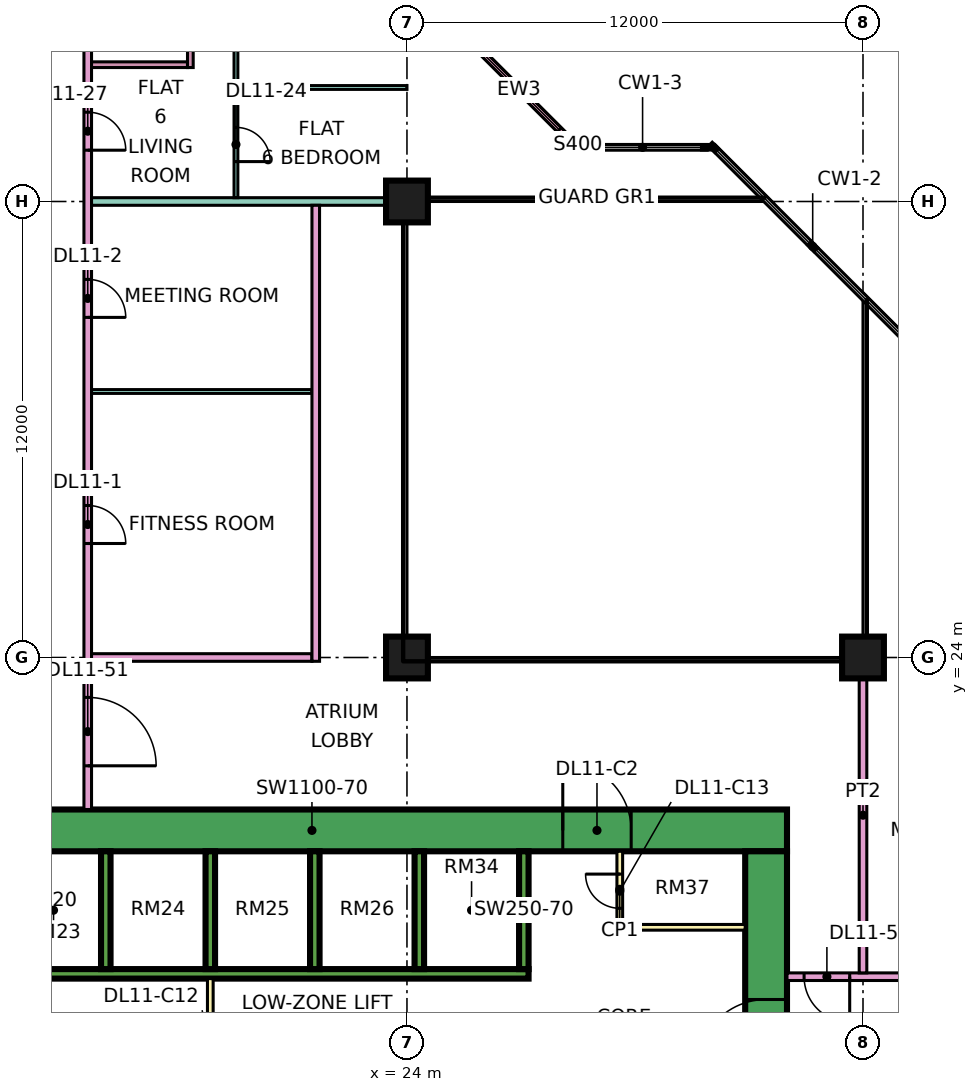
"""IFC4 building model, lengths in metres.
Left out: names, types, materials, properties, quantities, classifications, styles, units other than length and angle.
Written with IfcOpenShell. Run it as: python <this file> out.ifc"""

import sys

from ifc_helpers import new_model, si_unit, direction, frame, frame_2d, origin, origin_2d, place, context, subcontext, project, spatial, rectangle, extrude, element, fill, save


model = new_model("IFC4")
c1 = context("Model", 3, precision=1e-05, world=origin(), true_north=direction((0.0, 1.0)))
c2 = subcontext(c1, "Body", "Model", "MODEL_VIEW")
j1 = project(units=[si_unit("LENGTHUNIT", "METRE"), si_unit("PLANEANGLEUNIT", "RADIAN")], contexts=[c1])
p1 = place(None, origin())
s1 = spatial("IfcSite", under=j1, at=p1, CompositionType="ELEMENT")
p2 = place(p1, origin())
s2 = spatial("IfcBuilding", under=s1, at=p2, CompositionType="ELEMENT")
p3 = place(p2, frame((0.0, 0.0, 56.4)))
s3 = spatial("IfcBuildingStorey", under=s2, at=p3, CompositionType="ELEMENT", Elevation=56.4)
for number, where, z_axis, x_axis in (
    (1, (24.0, 24.0, 0.0), (0.0, 0.0, 1.0), (1.0, 0.0, 0.0)),
    (2, (24.0, 36.0, 0.0), (0.0, 0.0, 1.0), (1.0, 0.0, 0.0)),
    (3, (36.0, 24.0, 0.0), (0.0, 0.0, 1.0), (1.0, 0.0, 0.0)),
):
    element("IfcColumn", number, at=place(p3, frame(where, z_axis=z_axis, x_axis=x_axis)), inside=s3, PredefinedType="COLUMN", context=c2, shape_type="SweptSolid", body=[
        extrude(rectangle(XDim=1.1, YDim=1.1, at=origin_2d()), origin(), (0.0, 0.0, 1.0), 3.75),
    ])
p4 = place(p3, frame((9.0, 19.45, 0.0), z_axis=(0.0, 0.0, 1.0), x_axis=(1.0, 0.0, 0.0)))
e4 = element("IfcWall", 4, at=p4, inside=s3, PredefinedType="SHEAR", context=c2, shape_type="SweptSolid", body=[
    extrude(rectangle(XDim=25.0, YDim=1.1, at=frame_2d((12.5, 0.0))), origin(), (0.0, 0.0, 1.0), 3.75),
])
p5 = place(p4, frame((19.1, 0.0, 0.0)))
e5 = element("IfcOpeningElement", 5, at=p5, cuts=e4, PredefinedType="OPENING", context=c2, shape_type="SweptSolid", body=[
    extrude(rectangle(XDim=1.8, YDim=2.4, at=frame_2d((0.9, 1.2))), frame((0.0, 0.56, 0.0), z_axis=(0.0, -1.0, 0.0), x_axis=(1.0, 0.0, 0.0)), (0.0, 0.0, 1.0), 1.12),
])
p6 = place(p3, frame((33.45, 8.1, 0.0), z_axis=(0.0, 0.0, 1.0), x_axis=(0.0, 1.0, 0.0)))
e6 = element("IfcWall", 6, at=p6, inside=s3, PredefinedType="SHEAR", context=c2, shape_type="SweptSolid", body=[
    extrude(rectangle(XDim=10.8, YDim=1.1, at=frame_2d((5.4, 0.0))), origin(), (0.0, 0.0, 1.0), 3.75),
])
p7 = place(p6, frame((5.1, 0.0, 0.0)))
e7 = element("IfcOpeningElement", 7, at=p7, cuts=e6, PredefinedType="OPENING", context=c2, shape_type="SweptSolid", body=[
    extrude(rectangle(XDim=1.8, YDim=2.4, at=frame_2d((0.9, 1.2))), frame((0.0, 0.56, 0.0), z_axis=(0.0, -1.0, 0.0), x_axis=(1.0, 0.0, 0.0)), (0.0, 0.0, 1.0), 1.12),
])
p8 = place(p3, frame((13.45, 15.675, 0.0), z_axis=(0.0, 0.0, 1.0), x_axis=(1.0, 0.0, 0.0)))
e8 = element("IfcWall", 8, at=p8, inside=s3, PredefinedType="SHEAR", context=c2, shape_type="SweptSolid", body=[
    extrude(rectangle(XDim=13.75, YDim=0.25, at=frame_2d((6.875, 0.0))), origin(), (0.0, 0.0, 1.0), 3.75),
])
for number, where, z_axis, x_axis in (
    (9, (16.075, 15.8, 0.0), (0.0, 0.0, 1.0), (0.0, 1.0, 0.0)),
    (10, (18.825, 15.8, 0.0), (0.0, 0.0, 1.0), (0.0, 1.0, 0.0)),
    (11, (21.575, 15.8, 0.0), (0.0, 0.0, 1.0), (0.0, 1.0, 0.0)),
    (12, (24.325, 15.8, 0.0), (0.0, 0.0, 1.0), (0.0, 1.0, 0.0)),
    (13, (27.075, 15.8, 0.0), (0.0, 0.0, 1.0), (0.0, 1.0, 0.0)),
):
    element("IfcWall", number, at=place(p3, frame(where, z_axis=z_axis, x_axis=x_axis)), inside=s3, PredefinedType="SHEAR", context=c2, shape_type="SweptSolid", body=[
        extrude(rectangle(XDim=3.1, YDim=0.25, at=frame_2d((1.55, 0.0))), origin(), (0.0, 0.0, 1.0), 3.75),
    ])
p9 = place(p3, frame((28.447, 37.447, 0.0), z_axis=(0.0, 0.0, 1.0), x_axis=(-0.707106781187, 0.707106781187, 0.0)))
e14 = element("IfcWall", 14, at=p9, inside=s3, PredefinedType="SOLIDWALL", context=c2, shape_type="SweptSolid", body=[
    extrude(rectangle(XDim=4.243, YDim=0.15, at=frame_2d((2.121, 0.0))), origin(), (0.0, 0.0, 1.0), 3.35),
])
p10 = place(p9, frame((0.621, 0.0, 0.45)))
e15 = element("IfcOpeningElement", 15, at=p10, cuts=e14, PredefinedType="OPENING", context=c2, shape_type="SweptSolid", body=[
    extrude(rectangle(XDim=3.0, YDim=2.4, at=frame_2d((1.5, 1.2))), frame((0.0, 0.085, 0.0), z_axis=(0.0, -1.0, 0.0), x_axis=(1.0, 0.0, 0.0)), (0.0, 0.0, 1.0), 0.17),
])
p11 = place(p3, frame((18.825, 11.45, 0.0), z_axis=(0.0, 0.0, 1.0), x_axis=(0.0, 1.0, 0.0)))
e16 = element("IfcWall", 16, at=p11, inside=s3, PredefinedType="PARTITIONING", context=c2, shape_type="SweptSolid", body=[
    extrude(rectangle(XDim=4.1, YDim=0.15, at=frame_2d((2.05, 0.0))), origin(), (0.0, 0.0, 1.0), 3.35),
])
p12 = place(p11, frame((1.15, 0.0, 0.0)))
e17 = element("IfcOpeningElement", 17, at=p12, cuts=e16, PredefinedType="OPENING", context=c2, shape_type="SweptSolid", body=[
    extrude(rectangle(XDim=1.8, YDim=2.4, at=frame_2d((0.9, 1.2))), frame((0.0, 0.085, 0.0), z_axis=(0.0, -1.0, 0.0), x_axis=(1.0, 0.0, 0.0)), (0.0, 0.0, 1.0), 0.17),
])
p13 = place(p3, frame((29.6, 16.9, 0.0), z_axis=(0.0, 0.0, 1.0), x_axis=(0.0, 1.0, 0.0)))
e18 = element("IfcWall", 18, at=p13, inside=s3, PredefinedType="PARTITIONING", context=c2, shape_type="SweptSolid", body=[
    extrude(rectangle(XDim=2.0, YDim=0.15, at=frame_2d((1.0, 0.0))), origin(), (0.0, 0.0, 1.0), 3.35),
])
p14 = place(p13, frame((0.5, 0.0, 0.0)))
e19 = element("IfcOpeningElement", 19, at=p14, cuts=e18, PredefinedType="OPENING", context=c2, shape_type="SweptSolid", body=[
    extrude(rectangle(XDim=0.9, YDim=2.1, at=frame_2d((0.45, 1.05))), frame((0.0, 0.085, 0.0), z_axis=(0.0, -1.0, 0.0), x_axis=(1.0, 0.0, 0.0)), (0.0, 0.0, 1.0), 0.17),
])
p15 = place(p3, frame((29.6, 16.9, 0.0), z_axis=(0.0, 0.0, 1.0), x_axis=(1.0, 0.0, 0.0)))
e20 = element("IfcWall", 20, at=p15, inside=s3, PredefinedType="PARTITIONING", context=c2, shape_type="SweptSolid", body=[
    extrude(rectangle(XDim=3.3, YDim=0.15, at=frame_2d((1.65, 0.0))), origin(), (0.0, 0.0, 1.0), 3.35),
])
p16 = place(p3, frame((15.6, 20.0, 0.0), z_axis=(0.0, 0.0, 1.0), x_axis=(0.0, 1.0, 0.0)))
e21 = element("IfcWall", 21, at=p16, inside=s3, PredefinedType="PARTITIONING", context=c2, shape_type="SweptSolid", body=[
    extrude(rectangle(XDim=27.775, YDim=0.2, at=frame_2d((13.887, 0.0))), origin(), (0.0, 0.0, 1.0), 3.35),
])
p17 = place(p16, frame((7.0, 0.0, 0.0)))
e22 = element("IfcOpeningElement", 22, at=p17, cuts=e21, PredefinedType="OPENING", context=c2, shape_type="SweptSolid", body=[
    extrude(rectangle(XDim=1.0, YDim=2.1, at=frame_2d((0.5, 1.05))), frame((0.0, 0.11, 0.0), z_axis=(0.0, -1.0, 0.0), x_axis=(1.0, 0.0, 0.0)), (0.0, 0.0, 1.0), 0.22),
])
p18 = place(p16, frame((12.95, 0.0, 0.0)))
e23 = element("IfcOpeningElement", 23, at=p18, cuts=e21, PredefinedType="OPENING", context=c2, shape_type="SweptSolid", body=[
    extrude(rectangle(XDim=1.0, YDim=2.1, at=frame_2d((0.5, 1.05))), frame((0.0, 0.11, 0.0), z_axis=(0.0, -1.0, 0.0), x_axis=(1.0, 0.0, 0.0)), (0.0, 0.0, 1.0), 0.22),
])
p19 = place(p16, frame((17.35, 0.0, 0.0)))
e24 = element("IfcOpeningElement", 24, at=p19, cuts=e21, PredefinedType="OPENING", context=c2, shape_type="SweptSolid", body=[
    extrude(rectangle(XDim=1.0, YDim=2.1, at=frame_2d((0.5, 1.05))), frame((0.0, 0.11, 0.0), z_axis=(0.0, -1.0, 0.0), x_axis=(1.0, 0.0, 0.0)), (0.0, 0.0, 1.0), 0.22),
])
p20 = place(p16, frame((1.15, 0.0, 0.0)))
e25 = element("IfcOpeningElement", 25, at=p20, cuts=e21, PredefinedType="OPENING", context=c2, shape_type="SweptSolid", body=[
    extrude(rectangle(XDim=1.8, YDim=2.1, at=frame_2d((0.9, 1.05))), frame((0.0, 0.11, 0.0), z_axis=(0.0, -1.0, 0.0), x_axis=(1.0, 0.0, 0.0)), (0.0, 0.0, 1.0), 0.22),
])
p21 = place(p16, frame((25.9, 0.0, 0.0)))
e26 = element("IfcOpeningElement", 26, at=p21, cuts=e21, PredefinedType="OPENING", context=c2, shape_type="SweptSolid", body=[
    extrude(rectangle(XDim=1.0, YDim=2.1, at=frame_2d((0.5, 1.05))), frame((0.0, 0.11, 0.0), z_axis=(0.0, -1.0, 0.0), x_axis=(1.0, 0.0, 0.0)), (0.0, 0.0, 1.0), 0.22),
])
p22 = place(p3, frame((15.7, 24.0, 0.0), z_axis=(0.0, 0.0, 1.0), x_axis=(1.0, 0.0, 0.0)))
e27 = element("IfcWall", 27, at=p22, inside=s3, PredefinedType="PARTITIONING", context=c2, shape_type="SweptSolid", body=[
    extrude(rectangle(XDim=5.8, YDim=0.2, at=frame_2d((2.9, 0.0))), origin(), (0.0, 0.0, 1.0), 3.35),
])
p23 = place(p3, frame((15.7, 31.0, 0.0), z_axis=(0.0, 0.0, 1.0), x_axis=(1.0, 0.0, 0.0)))
e28 = element("IfcWall", 28, at=p23, inside=s3, PredefinedType="PARTITIONING", context=c2, shape_type="SweptSolid", body=[
    extrude(rectangle(XDim=5.8, YDim=0.1, at=frame_2d((2.9, 0.0))), origin(), (0.0, 0.0, 1.0), 3.35),
])
p24 = place(p3, frame((15.7, 36.0, 0.0), z_axis=(0.0, 0.0, 1.0), x_axis=(1.0, 0.0, 0.0)))
e29 = element("IfcWall", 29, at=p24, inside=s3, PredefinedType="PARTITIONING", context=c2, shape_type="SweptSolid", body=[
    extrude(rectangle(XDim=8.3, YDim=0.2, at=frame_2d((4.15, 0.0))), origin(), (0.0, 0.0, 1.0), 3.35),
])
p25 = place(p3, frame((15.7, 39.6, 0.0), z_axis=(0.0, 0.0, 1.0), x_axis=(1.0, 0.0, 0.0)))
e30 = element("IfcWall", 30, at=p25, inside=s3, PredefinedType="PARTITIONING", context=c2, shape_type="SweptSolid", body=[
    extrude(rectangle(XDim=2.525, YDim=0.15, at=frame_2d((1.263, 0.0))), origin(), (0.0, 0.0, 1.0), 3.35),
])
p26 = place(p3, frame((18.3, 39.525, 0.0), z_axis=(0.0, 0.0, 1.0), x_axis=(0.0, 1.0, 0.0)))
e31 = element("IfcWall", 31, at=p26, inside=s3, PredefinedType="PARTITIONING", context=c2, shape_type="SweptSolid", body=[
    extrude(rectangle(XDim=5.375, YDim=0.15, at=frame_2d((2.688, 0.0))), origin(), (0.0, 0.0, 1.0), 3.35),
])
p27 = place(p26, frame((0.925, 0.0, 0.0)))
e32 = element("IfcOpeningElement", 32, at=p27, cuts=e31, PredefinedType="OPENING", context=c2, shape_type="SweptSolid", body=[
    extrude(rectangle(XDim=0.8, YDim=2.1, at=frame_2d((0.4, 1.05))), frame((0.0, 0.085, 0.0), z_axis=(0.0, -1.0, 0.0), x_axis=(1.0, 0.0, 0.0)), (0.0, 0.0, 1.0), 0.17),
])
p28 = place(p26, frame((3.525, 0.0, 0.0)))
e33 = element("IfcOpeningElement", 33, at=p28, cuts=e31, PredefinedType="OPENING", context=c2, shape_type="SweptSolid", body=[
    extrude(rectangle(XDim=0.9, YDim=2.1, at=frame_2d((0.45, 1.05))), frame((0.0, 0.085, 0.0), z_axis=(0.0, -1.0, 0.0), x_axis=(1.0, 0.0, 0.0)), (0.0, 0.0, 1.0), 0.17),
])
p29 = place(p3, frame((19.5, 36.1, 0.0), z_axis=(0.0, 0.0, 1.0), x_axis=(0.0, 1.0, 0.0)))
e34 = element("IfcWall", 34, at=p29, inside=s3, PredefinedType="PARTITIONING", context=c2, shape_type="SweptSolid", body=[
    extrude(rectangle(XDim=5.95, YDim=0.1, at=frame_2d((2.975, 0.0))), origin(), (0.0, 0.0, 1.0), 3.35),
])
p30 = place(p29, frame((0.95, 0.0, 0.0)))
e35 = element("IfcOpeningElement", 35, at=p30, cuts=e34, PredefinedType="OPENING", context=c2, shape_type="SweptSolid", body=[
    extrude(rectangle(XDim=0.9, YDim=2.1, at=frame_2d((0.45, 1.05))), frame((0.0, 0.06, 0.0), z_axis=(0.0, -1.0, 0.0), x_axis=(1.0, 0.0, 0.0)), (0.0, 0.0, 1.0), 0.12),
])
p31 = place(p29, frame((3.95, 0.0, 0.0)))
e36 = element("IfcOpeningElement", 36, at=p31, cuts=e34, PredefinedType="OPENING", context=c2, shape_type="SweptSolid", body=[
    extrude(rectangle(XDim=0.9, YDim=2.1, at=frame_2d((0.45, 1.05))), frame((0.0, 0.06, 0.0), z_axis=(0.0, -1.0, 0.0), x_axis=(1.0, 0.0, 0.0)), (0.0, 0.0, 1.0), 0.12),
])
p32 = place(p3, frame((19.55, 39.0, 0.0), z_axis=(0.0, 0.0, 1.0), x_axis=(1.0, 0.0, 0.0)))
e37 = element("IfcWall", 37, at=p32, inside=s3, PredefinedType="PARTITIONING", context=c2, shape_type="SweptSolid", body=[
    extrude(rectangle(XDim=4.45, YDim=0.1, at=frame_2d((2.225, 0.0))), origin(), (0.0, 0.0, 1.0), 3.35),
])
p33 = place(p3, frame((21.6, 23.9, 0.0), z_axis=(0.0, 0.0, 1.0), x_axis=(0.0, 1.0, 0.0)))
e38 = element("IfcWall", 38, at=p33, inside=s3, PredefinedType="PARTITIONING", context=c2, shape_type="SweptSolid", body=[
    extrude(rectangle(XDim=12.0, YDim=0.2, at=frame_2d((6.0, 0.0))), origin(), (0.0, 0.0, 1.0), 3.35),
])
p34 = place(p3, frame((34.0, 15.6, 0.0), z_axis=(0.0, 0.0, 1.0), x_axis=(1.0, 0.0, 0.0)))
e39 = element("IfcWall", 39, at=p34, inside=s3, PredefinedType="PARTITIONING", context=c2, shape_type="SweptSolid", body=[
    extrude(rectangle(XDim=10.35, YDim=0.2, at=frame_2d((5.175, 0.0))), origin(), (0.0, 0.0, 1.0), 3.35),
])
p35 = place(p34, frame((5.6, 0.0, 0.0)))
e40 = element("IfcOpeningElement", 40, at=p35, cuts=e39, PredefinedType="OPENING", context=c2, shape_type="SweptSolid", body=[
    extrude(rectangle(XDim=1.0, YDim=2.1, at=frame_2d((0.5, 1.05))), frame((0.0, 0.11, 0.0), z_axis=(0.0, -1.0, 0.0), x_axis=(1.0, 0.0, 0.0)), (0.0, 0.0, 1.0), 0.22),
])
p36 = place(p34, frame((0.45, 0.0, 0.0)))
e41 = element("IfcOpeningElement", 41, at=p36, cuts=e39, PredefinedType="OPENING", context=c2, shape_type="SweptSolid", body=[
    extrude(rectangle(XDim=1.2, YDim=2.1, at=frame_2d((0.6, 1.05))), frame((0.0, 0.11, 0.0), z_axis=(0.0, -1.0, 0.0), x_axis=(1.0, 0.0, 0.0)), (0.0, 0.0, 1.0), 0.22),
])
p37 = place(p3, frame((36.0, 15.7, 0.0), z_axis=(0.0, 0.0, 1.0), x_axis=(0.0, 1.0, 0.0)))
e42 = element("IfcWall", 42, at=p37, inside=s3, PredefinedType="PARTITIONING", context=c2, shape_type="SweptSolid", body=[
    extrude(rectangle(XDim=8.3, YDim=0.2, at=frame_2d((4.15, 0.0))), origin(), (0.0, 0.0, 1.0), 3.35),
])
p38 = place(p10, origin())
e43 = element("IfcWindow", 43, at=p38, inside=s3, PartitioningType="SINGLE_PANEL", PredefinedType="WINDOW", context=c2, shape_type="SweptSolid", body=[
    extrude(rectangle(XDim=3.0, YDim=2.4, at=frame_2d((1.5, 1.2))), frame((0.0, 0.03, 0.0), z_axis=(0.0, -1.0, 0.0), x_axis=(1.0, 0.0, 0.0)), (0.0, 0.0, 1.0), 0.06),
])
fill(e15, e43)
p39 = place(p7, origin())
e44 = element("IfcDoor", 44, at=p39, inside=s3, OperationType="DOUBLE_DOOR_SINGLE_SWING", PredefinedType="DOOR", context=c2, shape_type="SweptSolid", body=[
    extrude(rectangle(XDim=1.8, YDim=2.4, at=frame_2d((0.9, 1.2))), frame((0.0, 0.025, 0.0), z_axis=(0.0, -1.0, 0.0), x_axis=(1.0, 0.0, 0.0)), (0.0, 0.0, 1.0), 0.05),
])
fill(e7, e44)
p40 = place(p5, origin())
e45 = element("IfcDoor", 45, at=p40, inside=s3, OperationType="DOUBLE_DOOR_SINGLE_SWING", PredefinedType="DOOR", context=c2, shape_type="SweptSolid", body=[
    extrude(rectangle(XDim=1.8, YDim=2.4, at=frame_2d((0.9, 1.2))), frame((0.0, 0.025, 0.0), z_axis=(0.0, -1.0, 0.0), x_axis=(1.0, 0.0, 0.0)), (0.0, 0.0, 1.0), 0.05),
])
fill(e5, e45)
p41 = place(p14, frame((0.9, 0.0, 0.0), z_axis=(0.0, 0.0, 1.0), x_axis=(-1.0, 0.0, 0.0)))
e46 = element("IfcDoor", 46, at=p41, inside=s3, OperationType="SINGLE_SWING_RIGHT", PredefinedType="DOOR", context=c2, shape_type="SweptSolid", body=[
    extrude(rectangle(XDim=0.9, YDim=2.1, at=frame_2d((0.45, 1.05))), frame((0.0, 0.025, 0.0), z_axis=(0.0, -1.0, 0.0), x_axis=(1.0, 0.0, 0.0)), (0.0, 0.0, 1.0), 0.05),
])
fill(e19, e46)
p42 = place(p17, frame((1.0, 0.0, 0.0), z_axis=(0.0, 0.0, 1.0), x_axis=(-1.0, 0.0, 0.0)))
e47 = element("IfcDoor", 47, at=p42, inside=s3, OperationType="SINGLE_SWING_LEFT", PredefinedType="DOOR", context=c2, shape_type="SweptSolid", body=[
    extrude(rectangle(XDim=1.0, YDim=2.1, at=frame_2d((0.5, 1.05))), frame((0.0, 0.025, 0.0), z_axis=(0.0, -1.0, 0.0), x_axis=(1.0, 0.0, 0.0)), (0.0, 0.0, 1.0), 0.05),
])
fill(e22, e47)
p43 = place(p18, frame((1.0, 0.0, 0.0), z_axis=(0.0, 0.0, 1.0), x_axis=(-1.0, 0.0, 0.0)))
e48 = element("IfcDoor", 48, at=p43, inside=s3, OperationType="SINGLE_SWING_LEFT", PredefinedType="DOOR", context=c2, shape_type="SweptSolid", body=[
    extrude(rectangle(XDim=1.0, YDim=2.1, at=frame_2d((0.5, 1.05))), frame((0.0, 0.025, 0.0), z_axis=(0.0, -1.0, 0.0), x_axis=(1.0, 0.0, 0.0)), (0.0, 0.0, 1.0), 0.05),
])
fill(e23, e48)
p44 = place(p30, frame((0.9, 0.0, 0.0), z_axis=(0.0, 0.0, 1.0), x_axis=(-1.0, 0.0, 0.0)))
e49 = element("IfcDoor", 49, at=p44, inside=s3, OperationType="SINGLE_SWING_LEFT", PredefinedType="DOOR", context=c2, shape_type="SweptSolid", body=[
    extrude(rectangle(XDim=0.9, YDim=2.1, at=frame_2d((0.45, 1.05))), frame((0.0, 0.025, 0.0), z_axis=(0.0, -1.0, 0.0), x_axis=(1.0, 0.0, 0.0)), (0.0, 0.0, 1.0), 0.05),
])
fill(e35, e49)
p45 = place(p19, frame((1.0, 0.0, 0.0), z_axis=(0.0, 0.0, 1.0), x_axis=(-1.0, 0.0, 0.0)))
e50 = element("IfcDoor", 50, at=p45, inside=s3, OperationType="SINGLE_SWING_LEFT", PredefinedType="DOOR", context=c2, shape_type="SweptSolid", body=[
    extrude(rectangle(XDim=1.0, YDim=2.1, at=frame_2d((0.5, 1.05))), frame((0.0, 0.025, 0.0), z_axis=(0.0, -1.0, 0.0), x_axis=(1.0, 0.0, 0.0)), (0.0, 0.0, 1.0), 0.05),
])
fill(e24, e50)
p46 = place(p36, origin())
e51 = element("IfcDoor", 51, at=p46, inside=s3, OperationType="SINGLE_SWING_RIGHT", PredefinedType="DOOR", context=c2, shape_type="SweptSolid", body=[
    extrude(rectangle(XDim=1.2, YDim=2.1, at=frame_2d((0.6, 1.05))), frame((0.0, 0.025, 0.0), z_axis=(0.0, -1.0, 0.0), x_axis=(1.0, 0.0, 0.0)), (0.0, 0.0, 1.0), 0.05),
])
fill(e41, e51)
p47 = place(p20, frame((1.8, 0.0, 0.0), z_axis=(0.0, 0.0, 1.0), x_axis=(-1.0, 0.0, 0.0)))
e52 = element("IfcDoor", 52, at=p47, inside=s3, OperationType="DOUBLE_DOOR_SINGLE_SWING", PredefinedType="DOOR", context=c2, shape_type="SweptSolid", body=[
    extrude(rectangle(XDim=1.8, YDim=2.1, at=frame_2d((0.9, 1.05))), frame((0.0, 0.025, 0.0), z_axis=(0.0, -1.0, 0.0), x_axis=(1.0, 0.0, 0.0)), (0.0, 0.0, 1.0), 0.05),
])
fill(e25, e52)
save(model, sys.argv[1])
